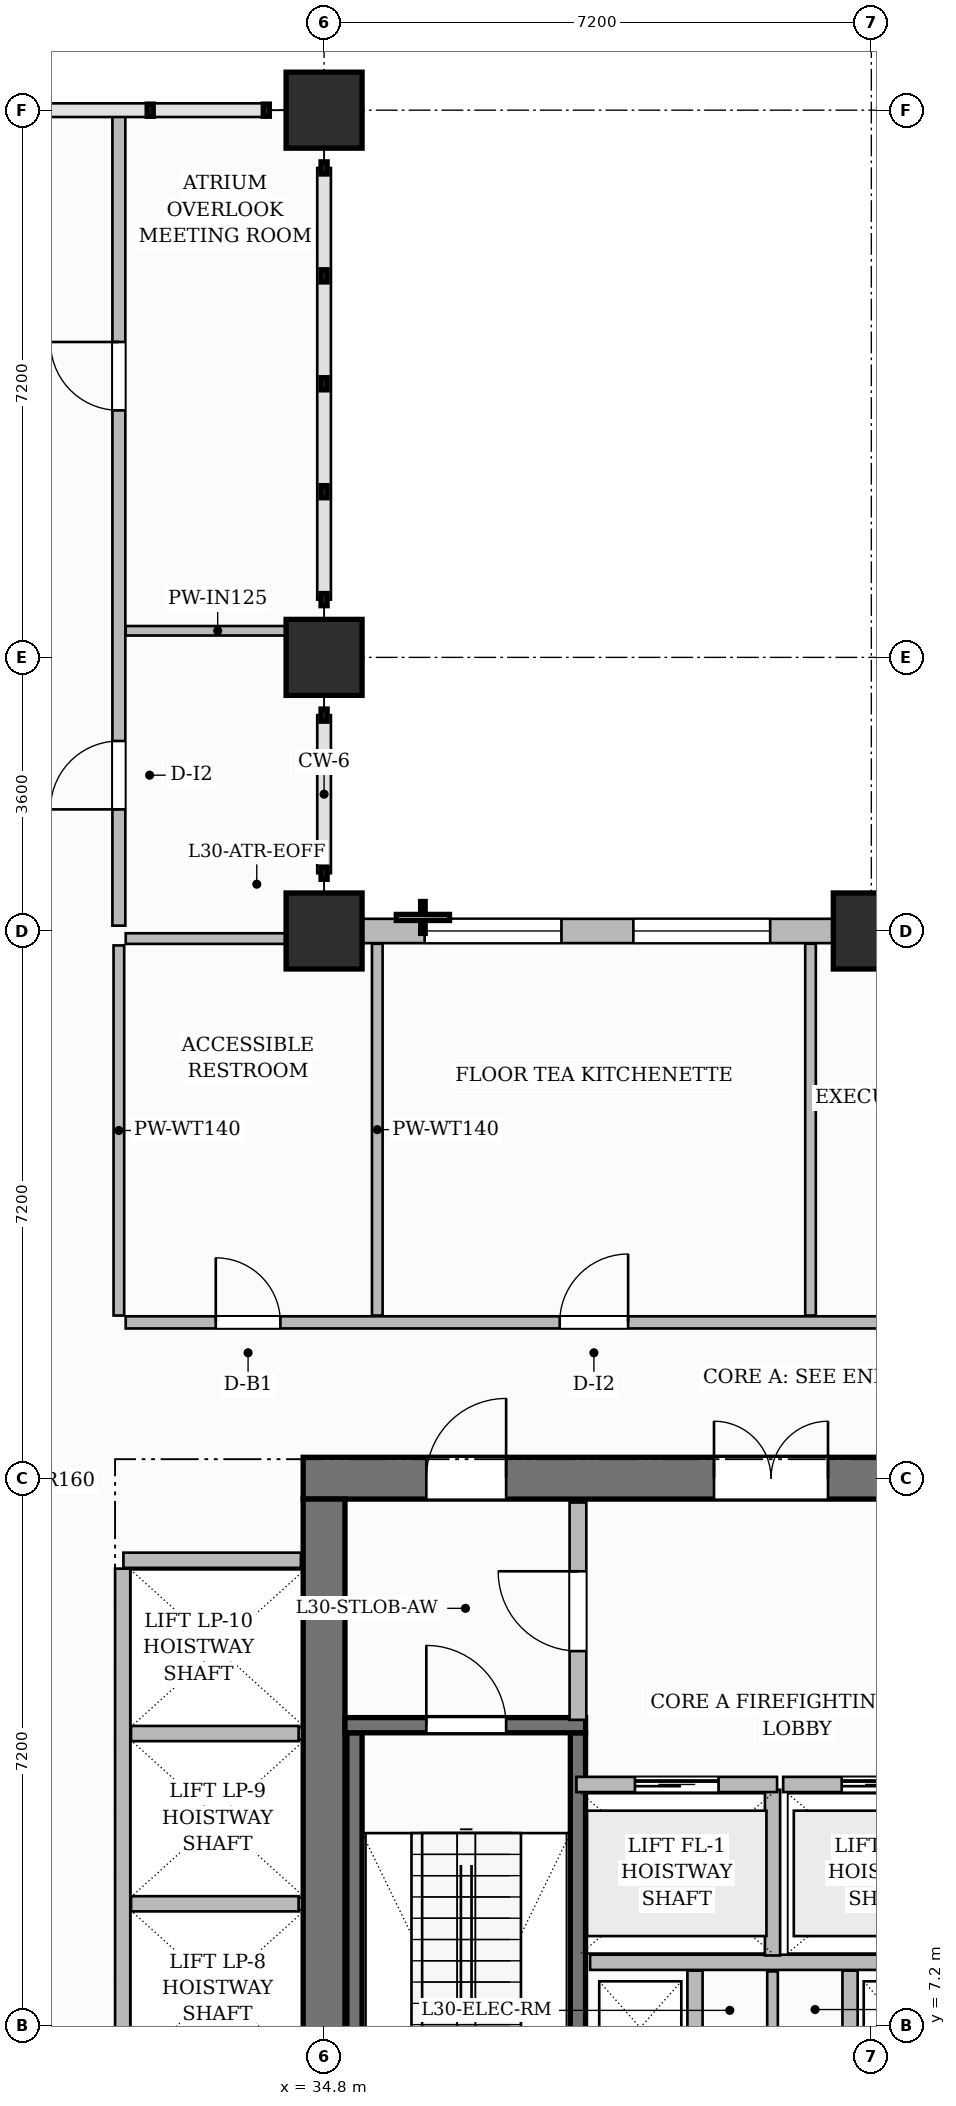
"""IFC4 building model, lengths in metres.
Left out: names, types, materials, properties, quantities, classifications, styles, units other than length and angle.
Written with IfcOpenShell. Run it as: python <this file> out.ifc"""

import sys

from ifc_helpers import new_model, si_unit, direction, frame, frame_2d, origin, origin_2d, place, context, subcontext, project, spatial, rectangle, extrude, source, transform, mapped, element, fill, save


model = new_model("IFC4")
c1 = context("Model", 3, precision=1e-05, world=origin(), true_north=direction((0.0, 1.0)))
c2 = subcontext(c1, "Body", "Model", "MODEL_VIEW")
j1 = project(units=[si_unit("LENGTHUNIT", "METRE"), si_unit("PLANEANGLEUNIT", "RADIAN")], contexts=[c1])
p1 = place(None, origin())
s1 = spatial("IfcSite", under=j1, at=p1, CompositionType="ELEMENT")
p2 = place(p1, origin())
s2 = spatial("IfcBuilding", under=s1, at=p2, CompositionType="ELEMENT")
p3 = place(p2, frame((0.0, 0.0, 122.9)))
s3 = spatial("IfcBuildingStorey", under=s2, at=p3, CompositionType="ELEMENT", Elevation=122.9)
p4 = place(p3, frame((34.525, 14.4, 0.0), z_axis=(0.0, 0.0, 1.0), x_axis=(1.0, 0.0, 0.0)))
e1 = element("IfcWall", 1, at=p4, inside=s3, PredefinedType="SHEAR", context=c2, shape_type="SweptSolid", body=[
    extrude(rectangle(XDim=15.55, YDim=0.55, at=frame_2d((7.775, 0.0))), origin(), (0.0, 0.0, 1.0), 3.7),
])
p5 = place(p4, frame((5.405, 0.0, 0.0)))
e2 = element("IfcOpeningElement", 2, at=p5, cuts=e1, PredefinedType="OPENING", context=c2, shape_type="SweptSolid", body=[
    extrude(rectangle(XDim=1.5, YDim=2.2, at=frame_2d((0.75, 1.1))), frame((0.0, 0.285, 0.0), z_axis=(0.0, -1.0, 0.0), x_axis=(1.0, 0.0, 0.0)), (0.0, 0.0, 1.0), 0.57),
])
p6 = place(p4, frame((1.62, 0.0, 0.0)))
e3 = element("IfcOpeningElement", 3, at=p6, cuts=e1, PredefinedType="OPENING", context=c2, shape_type="SweptSolid", body=[
    extrude(rectangle(XDim=1.05, YDim=2.15, at=frame_2d((0.525, 1.075))), frame((0.0, 0.285, 0.0), z_axis=(0.0, -1.0, 0.0), x_axis=(1.0, 0.0, 0.0)), (0.0, 0.0, 1.0), 0.57),
])
p7 = place(p4, frame((11.25, 0.0, 0.0)))
e4 = element("IfcOpeningElement", 4, at=p7, cuts=e1, PredefinedType="OPENING", context=c2, shape_type="SweptSolid", body=[
    extrude(rectangle(XDim=1.05, YDim=2.15, at=frame_2d((0.525, 1.075))), frame((0.0, 0.285, 0.0), z_axis=(0.0, -1.0, 0.0), x_axis=(1.0, 0.0, 0.0)), (0.0, 0.0, 1.0), 0.57),
])
p8 = place(p3, frame((34.8, 3.875, 0.0), z_axis=(0.0, 0.0, 1.0), x_axis=(0.0, 1.0, 0.0)))
e5 = element("IfcWall", 5, at=p8, inside=s3, PredefinedType="SHEAR", context=c2, shape_type="SweptSolid", body=[
    extrude(rectangle(XDim=10.25, YDim=0.55, at=frame_2d((5.125, 0.0))), origin(), (0.0, 0.0, 1.0), 3.7),
])
m1 = source(origin(), c2, "Body", "SweptSolid", [
    extrude(rectangle(XDim=1.0, YDim=1.0, at=origin_2d()), origin(), (0.0, 0.0, 1.0), 3.7),
])
for number, where, z_axis, x_axis in (
    (6, (34.8, 21.6, 0.0), (0.0, 0.0, 1.0), (1.0, 0.0, 0.0)),
    (7, (34.8, 25.2, 0.0), (0.0, 0.0, 1.0), (1.0, 0.0, 0.0)),
    (8, (34.8, 32.4, 0.0), (0.0, 0.0, 1.0), (1.0, 0.0, 0.0)),
    (9, (42.0, 21.6, 0.0), (0.0, 0.0, 1.0), (1.0, 0.0, 0.0)),
):
    element("IfcColumn", number, at=place(p3, frame(where, z_axis=z_axis, x_axis=x_axis)), inside=s3, PredefinedType="COLUMN", context=c2, shape_type="MappedRepresentation", body=[
        mapped(m1, transform((0.0, 0.0, 0.0), scale=1.0)),
    ])
for number, where, z_axis, x_axis in (
    (10, (35.2, 4.1, 0.0), (0.0, 0.0, 1.0), (0.0, 1.0, 0.0)),
    (11, (38.14, 4.1, 0.0), (0.0, 0.0, 1.0), (0.0, 1.0, 0.0)),
):
    element("IfcWall", number, at=place(p3, frame(where, z_axis=z_axis, x_axis=x_axis)), inside=s3, PredefinedType="SHEAR", context=c2, shape_type="SweptSolid", body=[
        extrude(rectangle(XDim=6.95, YDim=0.2, at=frame_2d((3.475, 0.0))), origin(), (0.0, 0.0, 1.0), 3.7),
    ])
p9 = place(p3, frame((35.075, 11.15, 0.0), z_axis=(0.0, 0.0, 1.0), x_axis=(1.0, 0.0, 0.0)))
e12 = element("IfcWall", 12, at=p9, inside=s3, PredefinedType="SHEAR", context=c2, shape_type="SweptSolid", body=[
    extrude(rectangle(XDim=3.165, YDim=0.2, at=frame_2d((1.583, 0.0))), origin(), (0.0, 0.0, 1.0), 3.7),
])
p10 = place(p9, frame((1.07, 0.0, 0.0)))
e13 = element("IfcOpeningElement", 13, at=p10, cuts=e12, PredefinedType="OPENING", context=c2, shape_type="SweptSolid", body=[
    extrude(rectangle(XDim=1.05, YDim=2.2, at=frame_2d((0.525, 1.1))), frame((0.0, 0.11, 0.0), z_axis=(0.0, -1.0, 0.0), x_axis=(1.0, 0.0, 0.0)), (0.0, 0.0, 1.0), 0.22),
])
p11 = place(p3, frame((38.3, 8.03, 0.0), z_axis=(0.0, 0.0, 1.0), x_axis=(1.0, 0.0, 0.0)))
e14 = element("IfcWall", 14, at=p11, inside=s3, PredefinedType="PARTITIONING", context=c2, shape_type="SweptSolid", body=[
    extrude(rectangle(XDim=4.74, YDim=0.2, at=frame_2d((2.37, 0.0))), origin(), (0.0, 0.0, 1.0), 3.45),
])
p12 = place(p3, frame((40.7, 8.12, 0.0), z_axis=(0.0, 0.0, 1.0), x_axis=(0.0, 1.0, 0.0)))
e15 = element("IfcWall", 15, at=p12, inside=s3, PredefinedType="PARTITIONING", context=c2, shape_type="SweptSolid", body=[
    extrude(rectangle(XDim=2.18, YDim=0.2, at=frame_2d((1.09, 0.0))), origin(), (0.0, 0.0, 1.0), 3.45),
])
p13 = place(p3, frame((38.14, 11.22, 0.0), z_axis=(0.0, 0.0, 1.0), x_axis=(0.0, 1.0, 0.0)))
e16 = element("IfcWall", 16, at=p13, inside=s3, PredefinedType="PARTITIONING", context=c2, shape_type="SweptSolid", body=[
    extrude(rectangle(XDim=2.86, YDim=0.22, at=frame_2d((1.43, 0.0))), origin(), (0.0, 0.0, 1.0), 3.45),
])
p14 = place(p13, frame((0.905, 0.0, 0.0)))
e17 = element("IfcOpeningElement", 17, at=p14, cuts=e16, PredefinedType="OPENING", context=c2, shape_type="SweptSolid", body=[
    extrude(rectangle(XDim=1.05, YDim=2.15, at=frame_2d((0.525, 1.075))), frame((0.0, 0.12, 0.0), z_axis=(0.0, -1.0, 0.0), x_axis=(1.0, 0.0, 0.0)), (0.0, 0.0, 1.0), 0.24),
])
for number, where, z_axis, x_axis in (
    (18, (39.68, 6.13, 0.0), (0.0, 0.0, 1.0), (0.0, 1.0, 0.0)),
    (19, (41.72, 6.13, 0.0), (0.0, 0.0, 1.0), (0.0, 1.0, 0.0)),
):
    element("IfcWall", number, at=place(p3, frame(where, z_axis=z_axis, x_axis=x_axis)), inside=s3, PredefinedType="PARTITIONING", context=c2, shape_type="SweptSolid", body=[
        extrude(rectangle(XDim=1.79, YDim=0.2, at=frame_2d((0.895, 0.0))), origin(), (0.0, 0.0, 1.0), 3.45),
    ])
p15 = place(p3, frame((40.7, 3.895, 0.0), z_axis=(0.0, 0.0, 1.0), x_axis=(0.0, 1.0, 0.0)))
e20 = element("IfcWall", 20, at=p15, inside=s3, PredefinedType="PARTITIONING", context=c2, shape_type="SweptSolid", body=[
    extrude(rectangle(XDim=4.015, YDim=0.14, at=frame_2d((2.007, 0.0))), origin(), (0.0, 0.0, 1.0), 3.45),
])
p16 = place(p3, frame((32.16, 13.32, 0.0), z_axis=(0.0, 0.0, 1.0), x_axis=(1.0, 0.0, 0.0)))
e21 = element("IfcWall", 21, at=p16, inside=s3, PredefinedType="PARTITIONING", context=c2, shape_type="SweptSolid", body=[
    extrude(rectangle(XDim=2.335, YDim=0.2, at=frame_2d((1.167, 0.0))), origin(), (0.0, 0.0, 1.0), 3.45),
])
p17 = place(p3, frame((32.15, 4.39, 0.0), z_axis=(0.0, 0.0, 1.0), x_axis=(0.0, 1.0, 0.0)))
e22 = element("IfcWall", 22, at=p17, inside=s3, PredefinedType="PARTITIONING", context=c2, shape_type="SweptSolid", body=[
    extrude(rectangle(XDim=8.82, YDim=0.2, at=frame_2d((4.41, 0.0))), origin(), (0.0, 0.0, 1.0), 3.45),
])
for number, where, z_axis, x_axis in (
    (23, (32.26, 8.8, 0.0), (0.0, 0.0, 1.0), (1.0, 0.0, 0.0)),
    (24, (32.26, 11.04, 0.0), (0.0, 0.0, 1.0), (1.0, 0.0, 0.0)),
):
    element("IfcWall", number, at=place(p3, frame(where, z_axis=z_axis, x_axis=x_axis)), inside=s3, PredefinedType="PARTITIONING", context=c2, shape_type="SweptSolid", body=[
        extrude(rectangle(XDim=2.205, YDim=0.2, at=frame_2d((1.103, 0.0))), origin(), (0.0, 0.0, 1.0), 3.45),
    ])
p18 = place(p3, frame((32.19, 16.45, 0.0), z_axis=(0.0, 0.0, 1.0), x_axis=(1.0, 0.0, 0.0)))
e25 = element("IfcWall", 25, at=p18, inside=s3, PredefinedType="PARTITIONING", context=c2, shape_type="SweptSolid", body=[
    extrude(rectangle(XDim=17.47, YDim=0.16, at=frame_2d((8.735, 0.0))), origin(), (0.0, 0.0, 1.0), 3.45),
])
p19 = place(p18, frame((1.185, 0.0, 0.0)))
e26 = element("IfcOpeningElement", 26, at=p19, cuts=e25, PredefinedType="OPENING", context=c2, shape_type="SweptSolid", body=[
    extrude(rectangle(XDim=0.85, YDim=2.1, at=frame_2d((0.425, 1.05))), frame((0.0, 0.09, 0.0), z_axis=(0.0, -1.0, 0.0), x_axis=(1.0, 0.0, 0.0)), (0.0, 0.0, 1.0), 0.18),
])
p20 = place(p18, frame((5.71, 0.0, 0.0)))
e27 = element("IfcOpeningElement", 27, at=p20, cuts=e25, PredefinedType="OPENING", context=c2, shape_type="SweptSolid", body=[
    extrude(rectangle(XDim=0.9, YDim=2.15, at=frame_2d((0.45, 1.075))), frame((0.0, 0.09, 0.0), z_axis=(0.0, -1.0, 0.0), x_axis=(1.0, 0.0, 0.0)), (0.0, 0.0, 1.0), 0.18),
])
p21 = place(p18, frame((12.56, 0.0, 0.0)))
e28 = element("IfcOpeningElement", 28, at=p21, cuts=e25, PredefinedType="OPENING", context=c2, shape_type="SweptSolid", body=[
    extrude(rectangle(XDim=1.4, YDim=2.35, at=frame_2d((0.7, 1.175))), frame((0.0, 0.09, 0.0), z_axis=(0.0, -1.0, 0.0), x_axis=(1.0, 0.0, 0.0)), (0.0, 0.0, 1.0), 0.18),
])
p22 = place(p3, frame((32.1, 16.54, 0.0), z_axis=(0.0, 0.0, 1.0), x_axis=(0.0, 1.0, 0.0)))
e29 = element("IfcWall", 29, at=p22, inside=s3, PredefinedType="PARTITIONING", context=c2, shape_type="SweptSolid", body=[
    extrude(rectangle(XDim=4.87, YDim=0.14, at=frame_2d((2.435, 0.0))), origin(), (0.0, 0.0, 1.0), 3.45),
])
for number, where, z_axis, x_axis in (
    (30, (35.5, 16.54, 0.0), (0.0, 0.0, 1.0), (0.0, 1.0, 0.0)),
    (31, (41.2, 16.54, 0.0), (0.0, 0.0, 1.0), (0.0, 1.0, 0.0)),
):
    element("IfcWall", number, at=place(p3, frame(where, z_axis=z_axis, x_axis=x_axis)), inside=s3, PredefinedType="PARTITIONING", context=c2, shape_type="SweptSolid", body=[
        extrude(rectangle(XDim=4.892, YDim=0.14, at=frame_2d((2.446, 0.0))), origin(), (0.0, 0.0, 1.0), 3.45),
    ])
p23 = place(p3, frame((32.19, 21.5, 0.0), z_axis=(0.0, 0.0, 1.0), x_axis=(1.0, 0.0, 0.0)))
e32 = element("IfcWall", 32, at=p23, inside=s3, PredefinedType="PARTITIONING", context=c2, shape_type="SweptSolid", body=[
    extrude(rectangle(XDim=2.42, YDim=0.14, at=frame_2d((1.21, 0.0))), origin(), (0.0, 0.0, 1.0), 2.935),
])
p24 = place(p3, frame((32.1, 21.67, 0.0), z_axis=(0.0, 0.0, 1.0), x_axis=(0.0, 1.0, 0.0)))
e33 = element("IfcWall", 33, at=p24, inside=s3, PredefinedType="PARTITIONING", context=c2, shape_type="SweptSolid", body=[
    extrude(rectangle(XDim=10.702, YDim=0.17, at=frame_2d((5.351, 0.0))), origin(), (0.0, 0.0, 1.0), 3.45),
])
p25 = place(p24, frame((1.53, 0.0, 0.0)))
e34 = element("IfcOpeningElement", 34, at=p25, cuts=e33, PredefinedType="OPENING", context=c2, shape_type="SweptSolid", body=[
    extrude(rectangle(XDim=0.9, YDim=2.15, at=frame_2d((0.45, 1.075))), frame((0.0, 0.095, 0.0), z_axis=(0.0, -1.0, 0.0), x_axis=(1.0, 0.0, 0.0)), (0.0, 0.0, 1.0), 0.19),
])
p26 = place(p24, frame((6.78, 0.0, 0.0)))
e35 = element("IfcOpeningElement", 35, at=p26, cuts=e33, PredefinedType="OPENING", context=c2, shape_type="SweptSolid", body=[
    extrude(rectangle(XDim=0.9, YDim=2.15, at=frame_2d((0.45, 1.075))), frame((0.0, 0.095, 0.0), z_axis=(0.0, -1.0, 0.0), x_axis=(1.0, 0.0, 0.0)), (0.0, 0.0, 1.0), 0.19),
])
p27 = place(p3, frame((32.19, 25.55, 0.0), z_axis=(0.0, 0.0, 1.0), x_axis=(1.0, 0.0, 0.0)))
e36 = element("IfcWall", 36, at=p27, inside=s3, PredefinedType="PARTITIONING", context=c2, shape_type="SweptSolid", body=[
    extrude(rectangle(XDim=2.42, YDim=0.125, at=frame_2d((1.21, 0.0))), origin(), (0.0, 0.0, 1.0), 3.45),
])
p28 = place(p3, frame((38.12, 10.37, 0.0), z_axis=(0.0, 0.0, 1.0), x_axis=(1.0, 0.0, 0.0)))
e37 = element("IfcWall", 37, at=p28, inside=s3, PredefinedType="PARTITIONING", context=c2, shape_type="SweptSolid", body=[
    extrude(rectangle(XDim=2.64, YDim=0.2, at=frame_2d((1.32, 0.0))), origin(), (0.0, 0.0, 1.0), 3.45),
])
p29 = place(p28, frame((0.77, 0.0, 0.0)))
e38 = element("IfcOpeningElement", 38, at=p29, cuts=e37, PredefinedType="OPENING", context=c2, shape_type="SweptSolid", body=[
    extrude(rectangle(XDim=1.1, YDim=2.2, at=frame_2d((0.55, 1.1))), frame((0.0, 0.11, 0.0), z_axis=(0.0, -1.0, 0.0), x_axis=(1.0, 0.0, 0.0)), (0.0, 0.0, 1.0), 0.22),
])
p30 = place(p3, frame((40.84, 10.37, 0.0), z_axis=(0.0, 0.0, 1.0), x_axis=(1.0, 0.0, 0.0)))
e39 = element("IfcWall", 39, at=p30, inside=s3, PredefinedType="PARTITIONING", context=c2, shape_type="SweptSolid", body=[
    extrude(rectangle(XDim=2.64, YDim=0.2, at=frame_2d((1.32, 0.0))), origin(), (0.0, 0.0, 1.0), 3.45),
])
p31 = place(p30, frame((0.77, 0.0, 0.0)))
e40 = element("IfcOpeningElement", 40, at=p31, cuts=e39, PredefinedType="OPENING", context=c2, shape_type="SweptSolid", body=[
    extrude(rectangle(XDim=1.1, YDim=2.2, at=frame_2d((0.55, 1.1))), frame((0.0, 0.11, 0.0), z_axis=(0.0, -1.0, 0.0), x_axis=(1.0, 0.0, 0.0)), (0.0, 0.0, 1.0), 0.22),
])
p32 = place(p3, frame((34.8, 21.6, 0.0), z_axis=(0.0, 0.0, 1.0), x_axis=(1.0, 0.0, 0.0)))
e41 = element("IfcWall", 41, at=p32, inside=s3, PredefinedType="SOLIDWALL", context=c2, shape_type="SweptSolid", body=[
    extrude(rectangle(XDim=15.0, YDim=0.32, at=frame_2d((7.5, 0.0))), origin(), (0.0, 0.0, 1.0), 2.935),
])
p33 = place(p32, frame((1.323, 0.0, 0.8)))
e42 = element("IfcOpeningElement", 42, at=p33, cuts=e41, PredefinedType="OPENING", context=c2, shape_type="SweptSolid", body=[
    extrude(rectangle(XDim=1.8, YDim=1.85, at=frame_2d((0.9, 0.925))), frame((0.0, 0.17, 0.0), z_axis=(0.0, -1.0, 0.0), x_axis=(1.0, 0.0, 0.0)), (0.0, 0.0, 1.0), 0.34),
])
p34 = place(p32, frame((4.069, 0.0, 0.8)))
e43 = element("IfcOpeningElement", 43, at=p34, cuts=e41, PredefinedType="OPENING", context=c2, shape_type="SweptSolid", body=[
    extrude(rectangle(XDim=1.8, YDim=1.85, at=frame_2d((0.9, 0.925))), frame((0.0, 0.17, 0.0), z_axis=(0.0, -1.0, 0.0), x_axis=(1.0, 0.0, 0.0)), (0.0, 0.0, 1.0), 0.34),
])
p35 = place(p32, frame((8.675, 0.0, 0.8)))
e44 = element("IfcOpeningElement", 44, at=p35, cuts=e41, PredefinedType="OPENING", context=c2, shape_type="SweptSolid", body=[
    extrude(rectangle(XDim=1.8, YDim=1.85, at=frame_2d((0.9, 0.925))), frame((0.0, 0.17, 0.0), z_axis=(0.0, -1.0, 0.0), x_axis=(1.0, 0.0, 0.0)), (0.0, 0.0, 1.0), 0.34),
])
p36 = place(p32, frame((11.725, 0.0, 0.8)))
e45 = element("IfcOpeningElement", 45, at=p36, cuts=e41, PredefinedType="OPENING", context=c2, shape_type="SweptSolid", body=[
    extrude(rectangle(XDim=1.8, YDim=1.85, at=frame_2d((0.9, 0.925))), frame((0.0, 0.17, 0.0), z_axis=(0.0, -1.0, 0.0), x_axis=(1.0, 0.0, 0.0)), (0.0, 0.0, 1.0), 0.34),
])
m2 = source(origin(), c2, "Body", "SweptSolid", [
    extrude(rectangle(XDim=1.05, YDim=2.2, at=frame_2d((0.525, 1.1))), frame((0.0, 0.025, 0.0), z_axis=(0.0, -1.0, 0.0), x_axis=(1.0, 0.0, 0.0)), (0.0, 0.0, 1.0), 0.05),
])
p37 = place(p10, origin())
e46 = element("IfcDoor", 46, at=p37, inside=s3, OperationType="SINGLE_SWING_LEFT", PredefinedType="DOOR", context=c2, shape_type="MappedRepresentation", body=[
    mapped(m2, transform((0.0, 0.0, 0.0), scale=1.0)),
])
fill(e13, e46)
m3 = source(origin(), c2, "Body", "SweptSolid", [
    extrude(rectangle(XDim=1.05, YDim=2.15, at=frame_2d((0.525, 1.075))), frame((0.0, 0.025, 0.0), z_axis=(0.0, -1.0, 0.0), x_axis=(1.0, 0.0, 0.0)), (0.0, 0.0, 1.0), 0.05),
])
p38 = place(p14, origin())
e47 = element("IfcDoor", 47, at=p38, inside=s3, OperationType="SINGLE_SWING_RIGHT", PredefinedType="DOOR", context=c2, shape_type="MappedRepresentation", body=[
    mapped(m3, transform((0.0, 0.0, 0.0), scale=1.0)),
])
fill(e17, e47)
m4 = source(origin(), c2, "Body", "SweptSolid", [
    extrude(rectangle(XDim=1.5, YDim=2.2, at=frame_2d((0.75, 1.1))), frame((0.0, 0.025, 0.0), z_axis=(0.0, -1.0, 0.0), x_axis=(1.0, 0.0, 0.0)), (0.0, 0.0, 1.0), 0.05),
])
p39 = place(p5, origin())
e48 = element("IfcDoor", 48, at=p39, inside=s3, OperationType="DOUBLE_DOOR_SINGLE_SWING", PredefinedType="DOOR", context=c2, shape_type="MappedRepresentation", body=[
    mapped(m4, transform((0.0, 0.0, 0.0), scale=1.0)),
])
fill(e2, e48)
p40 = place(p6, origin())
e49 = element("IfcDoor", 49, at=p40, inside=s3, OperationType="SINGLE_SWING_RIGHT", PredefinedType="DOOR", context=c2, shape_type="MappedRepresentation", body=[
    mapped(m3, transform((0.0, 0.0, 0.0), scale=1.0)),
])
fill(e3, e49)
m5 = source(origin(), c2, "Body", "SweptSolid", [
    extrude(rectangle(XDim=0.85, YDim=2.1, at=frame_2d((0.425, 1.05))), frame((0.0, 0.025, 0.0), z_axis=(0.0, -1.0, 0.0), x_axis=(1.0, 0.0, 0.0)), (0.0, 0.0, 1.0), 0.05),
])
p41 = place(p19, origin())
e50 = element("IfcDoor", 50, at=p41, inside=s3, OperationType="SINGLE_SWING_LEFT", PredefinedType="DOOR", context=c2, shape_type="MappedRepresentation", body=[
    mapped(m5, transform((0.0, 0.0, 0.0), scale=1.0)),
])
fill(e26, e50)
m6 = source(origin(), c2, "Body", "SweptSolid", [
    extrude(rectangle(XDim=0.9, YDim=2.15, at=frame_2d((0.45, 1.075))), frame((0.0, 0.025, 0.0), z_axis=(0.0, -1.0, 0.0), x_axis=(1.0, 0.0, 0.0)), (0.0, 0.0, 1.0), 0.05),
])
p42 = place(p20, origin())
e51 = element("IfcDoor", 51, at=p42, inside=s3, OperationType="SINGLE_SWING_RIGHT", PredefinedType="DOOR", context=c2, shape_type="MappedRepresentation", body=[
    mapped(m6, transform((0.0, 0.0, 0.0), scale=1.0)),
])
fill(e27, e51)
p43 = place(p25, origin())
e52 = element("IfcDoor", 52, at=p43, inside=s3, OperationType="SINGLE_SWING_LEFT", PredefinedType="DOOR", context=c2, shape_type="MappedRepresentation", body=[
    mapped(m6, transform((0.0, 0.0, 0.0), scale=1.0)),
])
fill(e34, e52)
p44 = place(p26, origin())
e53 = element("IfcDoor", 53, at=p44, inside=s3, OperationType="SINGLE_SWING_RIGHT", PredefinedType="DOOR", context=c2, shape_type="MappedRepresentation", body=[
    mapped(m6, transform((0.0, 0.0, 0.0), scale=1.0)),
])
fill(e35, e53)
m7 = source(origin(), c2, "Body", "SweptSolid", [
    extrude(rectangle(XDim=1.1, YDim=2.2, at=frame_2d((0.55, 1.1))), frame((0.0, 0.025, 0.0), z_axis=(0.0, -1.0, 0.0), x_axis=(1.0, 0.0, 0.0)), (0.0, 0.0, 1.0), 0.05),
])
p45 = place(p29, origin())
e54 = element("IfcDoor", 54, at=p45, inside=s3, OperationType="SLIDING_TO_LEFT", PredefinedType="DOOR", context=c2, shape_type="MappedRepresentation", body=[
    mapped(m7, transform((0.0, 0.0, 0.0), scale=1.0)),
])
fill(e38, e54)
p46 = place(p31, origin())
e55 = element("IfcDoor", 55, at=p46, inside=s3, OperationType="SLIDING_TO_LEFT", PredefinedType="DOOR", context=c2, shape_type="MappedRepresentation", body=[
    mapped(m7, transform((0.0, 0.0, 0.0), scale=1.0)),
])
fill(e40, e55)
m8 = source(origin(), c2, "Body", "SweptSolid", [
    extrude(rectangle(XDim=1.8, YDim=1.85, at=frame_2d((0.9, 0.925))), frame((0.0, 0.03, 0.0), z_axis=(0.0, -1.0, 0.0), x_axis=(1.0, 0.0, 0.0)), (0.0, 0.0, 1.0), 0.06),
])
p47 = place(p33, origin())
e56 = element("IfcWindow", 56, at=p47, inside=s3, PartitioningType="DOUBLE_PANEL_VERTICAL", PredefinedType="WINDOW", context=c2, shape_type="MappedRepresentation", body=[
    mapped(m8, transform((0.0, 0.0, 0.0), scale=1.0)),
])
fill(e42, e56)
p48 = place(p34, origin())
e57 = element("IfcWindow", 57, at=p48, inside=s3, PartitioningType="DOUBLE_PANEL_VERTICAL", PredefinedType="WINDOW", context=c2, shape_type="MappedRepresentation", body=[
    mapped(m8, transform((0.0, 0.0, 0.0), scale=1.0)),
])
fill(e43, e57)
save(model, sys.argv[1])
